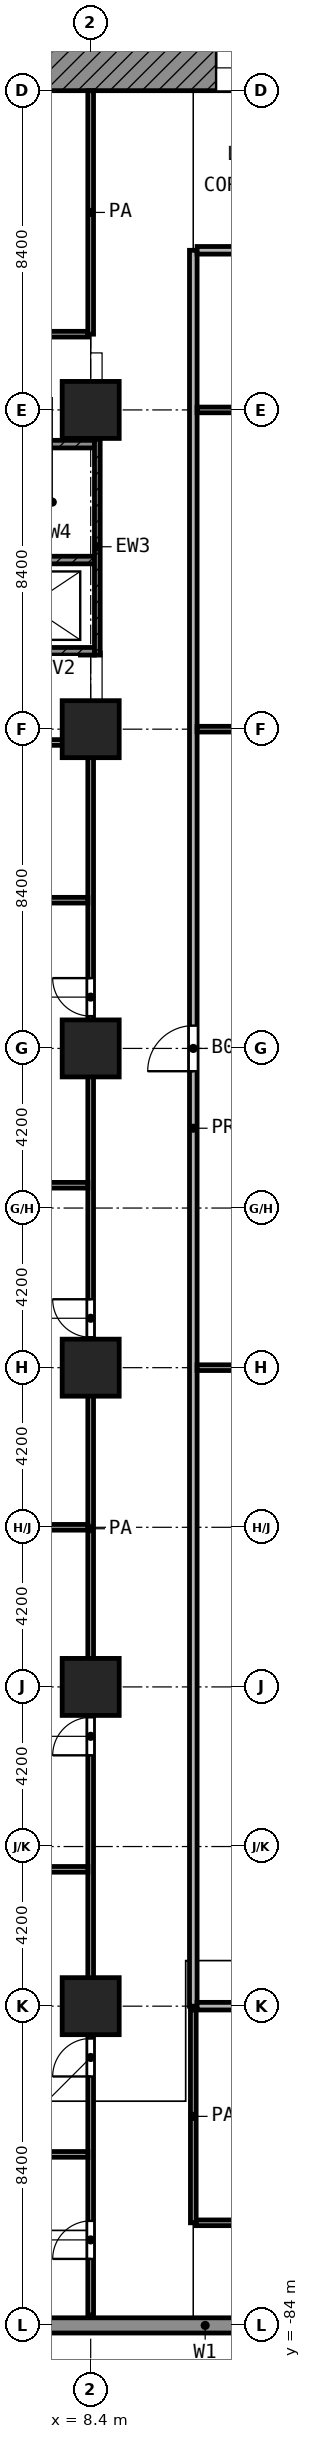
"""IFC4 building model, lengths in metres.
Left out: names, types, materials, properties, quantities, classifications, styles, units other than length and angle.
Written with IfcOpenShell. Run it as: python <this file> out.ifc"""

import sys

from ifc_helpers import new_model, si_unit, direction, frame, frame_2d, origin, origin_2d, place, context, subcontext, project, spatial, polyline, rectangle, outline, extrude, element, fill, save


model = new_model("IFC4")
c1 = context("Model", 3, precision=1e-05, world=origin(), true_north=direction((0.0, 1.0)))
c2 = subcontext(c1, "Body", "Model", "MODEL_VIEW")
j1 = project(units=[si_unit("LENGTHUNIT", "METRE"), si_unit("PLANEANGLEUNIT", "RADIAN")], contexts=[c1])
p1 = place(None, origin())
s1 = spatial("IfcSite", under=j1, at=p1, CompositionType="ELEMENT")
p2 = place(p1, origin())
s2 = spatial("IfcBuilding", under=s1, at=p2, CompositionType="ELEMENT")
p3 = place(p2, frame((0.0, 0.0, -6.0)))
s3 = spatial("IfcBuildingStorey", under=s2, at=p3, CompositionType="ELEMENT", Elevation=-6.0)
p4 = place(p3, origin())
e1 = element("IfcWall", 1, at=p4, inside=s3, PredefinedType="SOLIDWALL", context=c2, shape_type="SweptSolid", body=[
    extrude(outline(polyline([(6.725, -83.8), (16.1, -83.8), (16.1, -84.2), (6.725, -84.2), (6.725, -83.8)])), origin(), (0.0, 0.0, 1.0), 5.55),
])
for number, where, z_axis, x_axis in (
    (2, (8.4, -33.6, 0.0), (0.0, 0.0, 1.0), (1.0, 0.0, 0.0)),
    (3, (8.4, -42.0, 0.0), (0.0, 0.0, 1.0), (1.0, 0.0, 0.0)),
    (4, (8.4, -50.4, 0.0), (0.0, 0.0, 1.0), (1.0, 0.0, 0.0)),
    (5, (8.4, -58.8, 0.0), (0.0, 0.0, 1.0), (1.0, 0.0, 0.0)),
    (6, (8.4, -67.2, 0.0), (0.0, 0.0, 1.0), (1.0, 0.0, 0.0)),
    (7, (8.4, -75.6, 0.0), (0.0, 0.0, 1.0), (1.0, 0.0, 0.0)),
):
    element("IfcColumn", number, at=place(p3, frame(where, z_axis=z_axis, x_axis=x_axis)), inside=s3, PredefinedType="COLUMN", context=c2, shape_type="SweptSolid", body=[
        extrude(rectangle(XDim=1.5, YDim=1.5, at=origin_2d()), origin(), (0.0, 0.0, 1.0), 6.0),
    ])
p5 = place(p3, frame((5.4, -24.6, 0.0), z_axis=(0.0, 0.0, 1.0), x_axis=(1.0, 0.0, 0.0)))
e8 = element("IfcWall", 8, at=p5, inside=s3, PredefinedType="SHEAR", context=c2, shape_type="SweptSolid", body=[
    extrude(rectangle(XDim=18.6, YDim=1.2, at=frame_2d((9.3, 0.0))), origin(), (0.0, 0.0, 1.0), 5.55),
])
p6 = place(p5, frame((6.3, 0.0, 0.0)))
e9 = element("IfcOpeningElement", 9, at=p6, cuts=e8, PredefinedType="OPENING", context=c2, shape_type="SweptSolid", body=[
    extrude(rectangle(XDim=1.8, YDim=2.1, at=frame_2d((0.9, 1.05))), frame((0.0, 0.61, 0.0), z_axis=(0.0, -1.0, 0.0), x_axis=(1.0, 0.0, 0.0)), (0.0, 0.0, 1.0), 1.22),
])
p7 = place(p3, frame((8.575, -40.05, 0.0), z_axis=(0.0, 0.0, 1.0), x_axis=(0.0, 1.0, 0.0)))
e10 = element("IfcWall", 10, at=p7, inside=s3, PredefinedType="SHEAR", context=c2, shape_type="SweptSolid", body=[
    extrude(rectangle(XDim=5.7, YDim=0.15, at=frame_2d((2.85, 0.0))), origin(), (0.0, 0.0, 1.0), 5.55),
])
p8 = place(p3, frame((0.45, -34.5, 0.0), z_axis=(0.0, 0.0, 1.0), x_axis=(1.0, 0.0, 0.0)))
e11 = element("IfcWall", 11, at=p8, inside=s3, PredefinedType="SHEAR", context=c2, shape_type="SweptSolid", body=[
    extrude(rectangle(XDim=8.05, YDim=0.2, at=frame_2d((4.025, 0.0))), origin(), (0.0, 0.0, 1.0), 5.55),
])
p9 = place(p8, frame((0.75, 0.0, 0.0)))
e12 = element("IfcOpeningElement", 12, at=p9, cuts=e11, PredefinedType="OPENING", context=c2, shape_type="SweptSolid", body=[
    extrude(rectangle(XDim=1.1, YDim=2.1, at=frame_2d((0.55, 1.05))), frame((0.0, 0.11, 0.0), z_axis=(0.0, -1.0, 0.0), x_axis=(1.0, 0.0, 0.0)), (0.0, 0.0, 1.0), 0.22),
])
p10 = place(p3, frame((0.45, -37.55, 0.0), z_axis=(0.0, 0.0, 1.0), x_axis=(1.0, 0.0, 0.0)))
e13 = element("IfcWall", 13, at=p10, inside=s3, PredefinedType="SHEAR", context=c2, shape_type="SweptSolid", body=[
    extrude(rectangle(XDim=8.05, YDim=0.2, at=frame_2d((4.025, 0.0))), origin(), (0.0, 0.0, 1.0), 5.55),
])
p11 = place(p10, frame((0.1, 0.0, 0.0)))
e14 = element("IfcOpeningElement", 14, at=p11, cuts=e13, PredefinedType="OPENING", context=c2, shape_type="SweptSolid", body=[
    extrude(rectangle(XDim=1.1, YDim=2.1, at=frame_2d((0.55, 1.05))), frame((0.0, 0.11, 0.0), z_axis=(0.0, -1.0, 0.0), x_axis=(1.0, 0.0, 0.0)), (0.0, 0.0, 1.0), 0.22),
])
p12 = place(p3, frame((0.45, -39.95, 0.0), z_axis=(0.0, 0.0, 1.0), x_axis=(1.0, 0.0, 0.0)))
e15 = element("IfcWall", 15, at=p12, inside=s3, PredefinedType="SHEAR", context=c2, shape_type="SweptSolid", body=[
    extrude(rectangle(XDim=8.05, YDim=0.2, at=frame_2d((4.025, 0.0))), origin(), (0.0, 0.0, 1.0), 5.55),
])
p13 = place(p12, frame((2.0, 0.0, 0.0)))
e16 = element("IfcOpeningElement", 16, at=p13, cuts=e15, PredefinedType="OPENING", context=c2, shape_type="SweptSolid", body=[
    extrude(rectangle(XDim=1.1, YDim=2.1, at=frame_2d((0.55, 1.05))), frame((0.0, 0.11, 0.0), z_axis=(0.0, -1.0, 0.0), x_axis=(1.0, 0.0, 0.0)), (0.0, 0.0, 1.0), 0.22),
])
p14 = place(p3, frame((11.175, -81.3, 0.0), z_axis=(0.0, 0.0, 1.0), x_axis=(1.0, 0.0, 0.0)))
e17 = element("IfcWall", 17, at=p14, inside=s3, PredefinedType="PARTITIONING", context=c2, shape_type="SweptSolid", body=[
    extrude(rectangle(XDim=11.25, YDim=0.15, at=frame_2d((5.625, 0.0))), origin(), (0.0, 0.0, 1.0), 5.55),
])
p15 = place(p14, frame((5.125, 0.0, 0.0)))
e18 = element("IfcOpeningElement", 18, at=p15, cuts=e17, PredefinedType="OPENING", context=c2, shape_type="SweptSolid", body=[
    extrude(rectangle(XDim=1.0, YDim=2.1, at=frame_2d((0.5, 1.05))), frame((0.0, 0.085, 0.0), z_axis=(0.0, -1.0, 0.0), x_axis=(1.0, 0.0, 0.0)), (0.0, 0.0, 1.0), 0.17),
])
p16 = place(p3, frame((1.887, -79.5, 0.0), z_axis=(0.0, 0.0, 1.0), x_axis=(1.0, 0.0, 0.0)))
e19 = element("IfcWall", 19, at=p16, inside=s3, PredefinedType="PARTITIONING", context=c2, shape_type="SweptSolid", body=[
    extrude(rectangle(XDim=6.438, YDim=0.15, at=frame_2d((3.219, 0.0))), origin(), (0.0, 0.0, 1.0), 5.55),
])
for number, where, z_axis, x_axis in (
    (20, (0.274, -72.0, 0.0), (0.0, 0.0, 1.0), (1.0, 0.0, 0.0)),
    (21, (0.274, -63.0, 0.0), (0.0, 0.0, 1.0), (1.0, 0.0, 0.0)),
):
    element("IfcWall", number, at=place(p3, frame(where, z_axis=z_axis, x_axis=x_axis)), inside=s3, PredefinedType="PARTITIONING", context=c2, shape_type="SweptSolid", body=[
        extrude(rectangle(XDim=8.051, YDim=0.15, at=frame_2d((4.025, 0.0))), origin(), (0.0, 0.0, 1.0), 5.55),
    ])
p17 = place(p3, frame((11.2, -58.8, 0.0), z_axis=(0.0, 0.0, 1.0), x_axis=(1.0, 0.0, 0.0)))
e22 = element("IfcWall", 22, at=p17, inside=s3, PredefinedType="PARTITIONING", context=c2, shape_type="SweptSolid", body=[
    extrude(rectangle(XDim=11.2, YDim=0.15, at=frame_2d((5.6, 0.0))), origin(), (0.0, 0.0, 1.0), 5.55),
])
for number, where, z_axis, x_axis in (
    (23, (0.274, -54.0, 0.0), (0.0, 0.0, 1.0), (1.0, 0.0, 0.0)),
    (24, (0.274, -46.5, 0.0), (0.0, 0.0, 1.0), (1.0, 0.0, 0.0)),
):
    element("IfcWall", number, at=place(p3, frame(where, z_axis=z_axis, x_axis=x_axis)), inside=s3, PredefinedType="PARTITIONING", context=c2, shape_type="SweptSolid", body=[
        extrude(rectangle(XDim=8.051, YDim=0.15, at=frame_2d((4.025, 0.0))), origin(), (0.0, 0.0, 1.0), 5.55),
    ])
p18 = place(p3, frame((2.326, -42.35, 0.0), z_axis=(0.0, 0.0, 1.0), x_axis=(1.0, 0.0, 0.0)))
e25 = element("IfcWall", 25, at=p18, inside=s3, PredefinedType="PARTITIONING", context=c2, shape_type="SweptSolid", body=[
    extrude(rectangle(XDim=5.999, YDim=0.15, at=frame_2d((3.0, 0.0))), origin(), (0.0, 0.0, 1.0), 5.55),
])
p19 = place(p18, frame((2.499, 0.0, 0.0)))
e26 = element("IfcOpeningElement", 26, at=p19, cuts=e25, PredefinedType="OPENING", context=c2, shape_type="SweptSolid", body=[
    extrude(rectangle(XDim=1.0, YDim=2.1, at=frame_2d((0.5, 1.05))), frame((0.0, 0.085, 0.0), z_axis=(0.0, -1.0, 0.0), x_axis=(1.0, 0.0, 0.0)), (0.0, 0.0, 1.0), 0.17),
])
for number, where, z_axis, x_axis in (
    (27, (11.2, -42.0, 0.0), (0.0, 0.0, 1.0), (1.0, 0.0, 0.0)),
    (28, (11.2, -33.6, 0.0), (0.0, 0.0, 1.0), (1.0, 0.0, 0.0)),
):
    element("IfcWall", number, at=place(p3, frame(where, z_axis=z_axis, x_axis=x_axis)), inside=s3, PredefinedType="PARTITIONING", context=c2, shape_type="SweptSolid", body=[
        extrude(rectangle(XDim=11.2, YDim=0.15, at=frame_2d((5.6, 0.0))), origin(), (0.0, 0.0, 1.0), 5.55),
    ])
p20 = place(p3, frame((0.274, -31.607, 0.0), z_axis=(0.0, 0.0, 1.0), x_axis=(1.0, 0.0, 0.0)))
e29 = element("IfcWall", 29, at=p20, inside=s3, PredefinedType="PARTITIONING", context=c2, shape_type="SweptSolid", body=[
    extrude(rectangle(XDim=8.051, YDim=0.15, at=frame_2d((4.025, 0.0))), origin(), (0.0, 0.0, 1.0), 5.55),
])
p21 = place(p20, frame((3.426, 0.0, 0.0)))
e30 = element("IfcOpeningElement", 30, at=p21, cuts=e29, PredefinedType="OPENING", context=c2, shape_type="SweptSolid", body=[
    extrude(rectangle(XDim=1.0, YDim=2.1, at=frame_2d((0.5, 1.05))), frame((0.0, 0.085, 0.0), z_axis=(0.0, -1.0, 0.0), x_axis=(1.0, 0.0, 0.0)), (0.0, 0.0, 1.0), 0.17),
])
p22 = place(p3, frame((8.4, -83.726, 0.0), z_axis=(0.0, 0.0, 1.0), x_axis=(0.0, 1.0, 0.0)))
e31 = element("IfcWall", 31, at=p22, inside=s3, PredefinedType="PARTITIONING", context=c2, shape_type="SweptSolid", body=[
    extrude(rectangle(XDim=41.376, YDim=0.15, at=frame_2d((20.688, 0.0))), origin(), (0.0, 0.0, 1.0), 5.55),
])
p23 = place(p22, frame((34.176, 0.0, 0.0)))
e32 = element("IfcOpeningElement", 32, at=p23, cuts=e31, PredefinedType="OPENING", context=c2, shape_type="SweptSolid", body=[
    extrude(rectangle(XDim=1.0, YDim=2.1, at=frame_2d((0.5, 1.05))), frame((0.0, 0.085, 0.0), z_axis=(0.0, -1.0, 0.0), x_axis=(1.0, 0.0, 0.0)), (0.0, 0.0, 1.0), 0.17),
])
p24 = place(p22, frame((25.726, 0.0, 0.0)))
e33 = element("IfcOpeningElement", 33, at=p24, cuts=e31, PredefinedType="OPENING", context=c2, shape_type="SweptSolid", body=[
    extrude(rectangle(XDim=1.0, YDim=2.1, at=frame_2d((0.5, 1.05))), frame((0.0, 0.085, 0.0), z_axis=(0.0, -1.0, 0.0), x_axis=(1.0, 0.0, 0.0)), (0.0, 0.0, 1.0), 0.17),
])
p25 = place(p22, frame((14.726, 0.0, 0.0)))
e34 = element("IfcOpeningElement", 34, at=p25, cuts=e31, PredefinedType="OPENING", context=c2, shape_type="SweptSolid", body=[
    extrude(rectangle(XDim=1.0, YDim=2.1, at=frame_2d((0.5, 1.05))), frame((0.0, 0.085, 0.0), z_axis=(0.0, -1.0, 0.0), x_axis=(1.0, 0.0, 0.0)), (0.0, 0.0, 1.0), 0.17),
])
p26 = place(p22, frame((6.276, 0.0, 0.0)))
e35 = element("IfcOpeningElement", 35, at=p26, cuts=e31, PredefinedType="OPENING", context=c2, shape_type="SweptSolid", body=[
    extrude(rectangle(XDim=1.0, YDim=2.1, at=frame_2d((0.5, 1.05))), frame((0.0, 0.085, 0.0), z_axis=(0.0, -1.0, 0.0), x_axis=(1.0, 0.0, 0.0)), (0.0, 0.0, 1.0), 0.17),
])
p27 = place(p22, frame((1.476, 0.0, 0.0)))
e36 = element("IfcOpeningElement", 36, at=p27, cuts=e31, PredefinedType="OPENING", context=c2, shape_type="SweptSolid", body=[
    extrude(rectangle(XDim=1.0, YDim=2.1, at=frame_2d((0.5, 1.05))), frame((0.0, 0.085, 0.0), z_axis=(0.0, -1.0, 0.0), x_axis=(1.0, 0.0, 0.0)), (0.0, 0.0, 1.0), 0.17),
])
p28 = place(p3, frame((8.4, -31.607, 0.0), z_axis=(0.0, 0.0, 1.0), x_axis=(0.0, 1.0, 0.0)))
e37 = element("IfcWall", 37, at=p28, inside=s3, PredefinedType="PARTITIONING", context=c2, shape_type="SweptSolid", body=[
    extrude(rectangle(XDim=6.407, YDim=0.15, at=frame_2d((3.204, 0.0))), origin(), (0.0, 0.0, 1.0), 5.55),
])
p29 = place(p3, frame((11.1, -81.3, 0.0), z_axis=(0.0, 0.0, 1.0), x_axis=(0.0, 1.0, 0.0)))
e38 = element("IfcWall", 38, at=p29, inside=s3, PredefinedType="PARTITIONING", context=c2, shape_type="SweptSolid", body=[
    extrude(rectangle(XDim=5.6, YDim=0.15, at=frame_2d((2.8, 0.0))), origin(), (0.0, 0.0, 1.0), 5.55),
])
p30 = place(p3, frame((11.2, -75.6, 0.0), z_axis=(0.0, 0.0, 1.0), x_axis=(1.0, 0.0, 0.0)))
e39 = element("IfcWall", 39, at=p30, inside=s3, PredefinedType="PARTITIONING", context=c2, shape_type="SweptSolid", body=[
    extrude(rectangle(XDim=11.2, YDim=0.2, at=frame_2d((5.6, 0.0))), origin(), (0.0, 0.0, 1.0), 5.55),
])
p31 = place(p3, frame((11.2, -29.4, 0.0), z_axis=(0.0, 0.0, 1.0), x_axis=(1.0, 0.0, 0.0)))
e40 = element("IfcWall", 40, at=p31, inside=s3, PredefinedType="PARTITIONING", context=c2, shape_type="SweptSolid", body=[
    extrude(rectangle(XDim=2.8, YDim=0.2, at=frame_2d((1.4, 0.0))), origin(), (0.0, 0.0, 1.0), 5.55),
])
p32 = place(p3, frame((11.1, -75.6, 0.0), z_axis=(0.0, 0.0, 1.0), x_axis=(0.0, 1.0, 0.0)))
e41 = element("IfcWall", 41, at=p32, inside=s3, PredefinedType="PARTITIONING", context=c2, shape_type="SweptSolid", body=[
    extrude(rectangle(XDim=46.2, YDim=0.2, at=frame_2d((23.1, 0.0))), origin(), (0.0, 0.0, 1.0), 5.55),
])
p33 = place(p32, frame((24.6, 0.0, 0.0)))
e42 = element("IfcOpeningElement", 42, at=p33, cuts=e41, PredefinedType="OPENING", context=c2, shape_type="SweptSolid", body=[
    extrude(rectangle(XDim=1.2, YDim=2.1, at=frame_2d((0.6, 1.05))), frame((0.0, 0.11, 0.0), z_axis=(0.0, -1.0, 0.0), x_axis=(1.0, 0.0, 0.0)), (0.0, 0.0, 1.0), 0.22),
])
p34 = place(p6, origin())
e43 = element("IfcDoor", 43, at=p34, inside=s3, OperationType="DOUBLE_DOOR_SINGLE_SWING", PredefinedType="DOOR", context=c2, shape_type="SweptSolid", body=[
    extrude(rectangle(XDim=1.8, YDim=2.1, at=frame_2d((0.9, 1.05))), frame((0.0, 0.025, 0.0), z_axis=(0.0, -1.0, 0.0), x_axis=(1.0, 0.0, 0.0)), (0.0, 0.0, 1.0), 0.05),
])
fill(e9, e43)
p35 = place(p23, origin())
e44 = element("IfcDoor", 44, at=p35, inside=s3, OperationType="SINGLE_SWING_RIGHT", PredefinedType="DOOR", context=c2, shape_type="SweptSolid", body=[
    extrude(rectangle(XDim=1.0, YDim=2.1, at=frame_2d((0.5, 1.05))), frame((0.0, 0.025, 0.0), z_axis=(0.0, -1.0, 0.0), x_axis=(1.0, 0.0, 0.0)), (0.0, 0.0, 1.0), 0.05),
])
fill(e32, e44)
p36 = place(p24, origin())
e45 = element("IfcDoor", 45, at=p36, inside=s3, OperationType="SINGLE_SWING_RIGHT", PredefinedType="DOOR", context=c2, shape_type="SweptSolid", body=[
    extrude(rectangle(XDim=1.0, YDim=2.1, at=frame_2d((0.5, 1.05))), frame((0.0, 0.025, 0.0), z_axis=(0.0, -1.0, 0.0), x_axis=(1.0, 0.0, 0.0)), (0.0, 0.0, 1.0), 0.05),
])
fill(e33, e45)
p37 = place(p25, origin())
e46 = element("IfcDoor", 46, at=p37, inside=s3, OperationType="SINGLE_SWING_LEFT", PredefinedType="DOOR", context=c2, shape_type="SweptSolid", body=[
    extrude(rectangle(XDim=1.0, YDim=2.1, at=frame_2d((0.5, 1.05))), frame((0.0, 0.025, 0.0), z_axis=(0.0, -1.0, 0.0), x_axis=(1.0, 0.0, 0.0)), (0.0, 0.0, 1.0), 0.05),
])
fill(e34, e46)
p38 = place(p26, origin())
e47 = element("IfcDoor", 47, at=p38, inside=s3, OperationType="SINGLE_SWING_LEFT", PredefinedType="DOOR", context=c2, shape_type="SweptSolid", body=[
    extrude(rectangle(XDim=1.0, YDim=2.1, at=frame_2d((0.5, 1.05))), frame((0.0, 0.025, 0.0), z_axis=(0.0, -1.0, 0.0), x_axis=(1.0, 0.0, 0.0)), (0.0, 0.0, 1.0), 0.05),
])
fill(e35, e47)
p39 = place(p27, origin())
e48 = element("IfcDoor", 48, at=p39, inside=s3, OperationType="SINGLE_SWING_LEFT", PredefinedType="DOOR", context=c2, shape_type="SweptSolid", body=[
    extrude(rectangle(XDim=1.0, YDim=2.1, at=frame_2d((0.5, 1.05))), frame((0.0, 0.025, 0.0), z_axis=(0.0, -1.0, 0.0), x_axis=(1.0, 0.0, 0.0)), (0.0, 0.0, 1.0), 0.05),
])
fill(e36, e48)
p40 = place(p33, origin())
e49 = element("IfcDoor", 49, at=p40, inside=s3, OperationType="SINGLE_SWING_LEFT", PredefinedType="DOOR", context=c2, shape_type="SweptSolid", body=[
    extrude(rectangle(XDim=1.2, YDim=2.1, at=frame_2d((0.6, 1.05))), frame((0.0, 0.025, 0.0), z_axis=(0.0, -1.0, 0.0), x_axis=(1.0, 0.0, 0.0)), (0.0, 0.0, 1.0), 0.05),
])
fill(e42, e49)
save(model, sys.argv[1])
